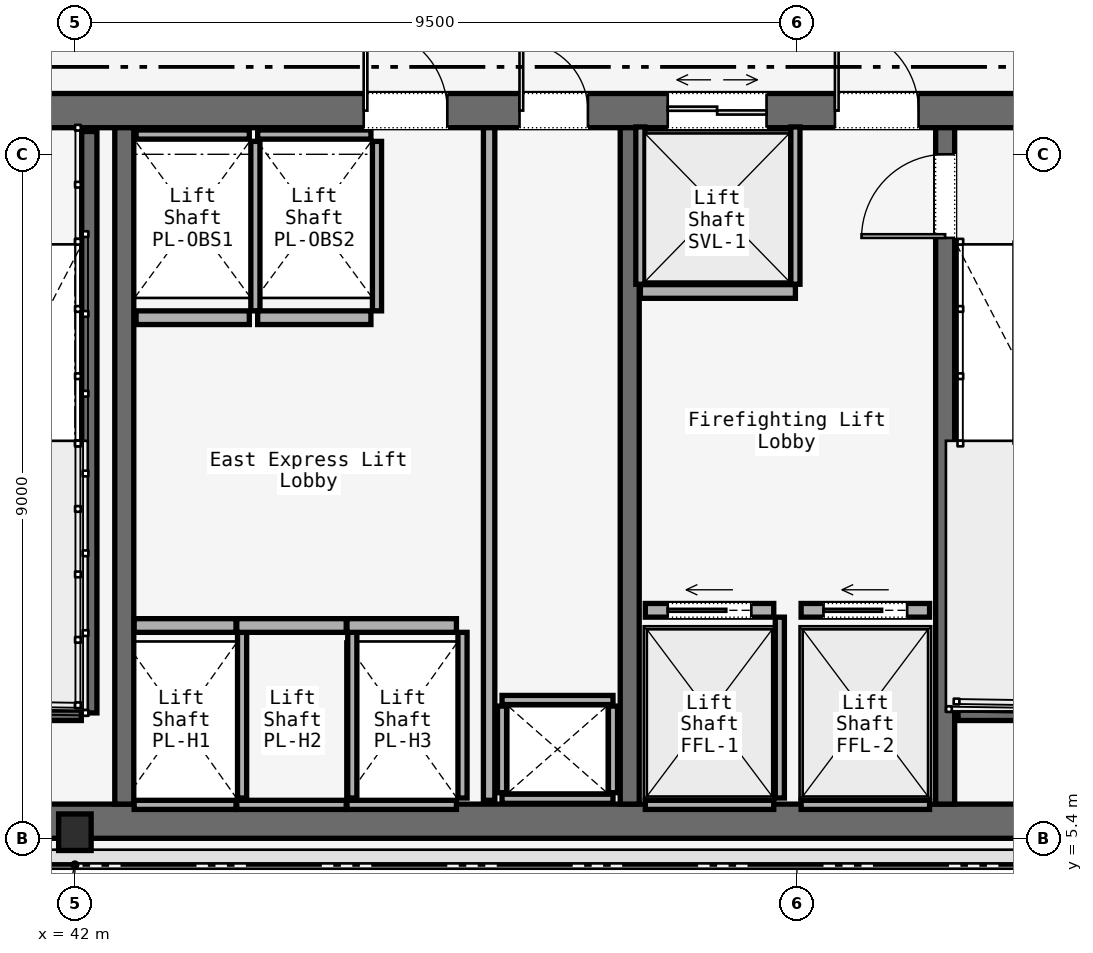
"""IFC4 building model, lengths in metres.
Left out: names, types, materials, properties, quantities, classifications, styles, units other than length and angle.
Written with IfcOpenShell. Run it as: python <this file> out.ifc"""

import sys

from ifc_helpers import new_model, si_unit, direction, frame, frame_2d, origin, origin_2d, place, context, subcontext, project, spatial, rectangle, i_section, extrude, element, fill, save


model = new_model("IFC4")
c1 = context("Model", 3, precision=1e-05, world=origin(), true_north=direction((0.0, 1.0)))
c2 = subcontext(c1, "Body", "Model", "MODEL_VIEW")
j1 = project(units=[si_unit("LENGTHUNIT", "METRE"), si_unit("PLANEANGLEUNIT", "RADIAN")], contexts=[c1])
p1 = place(None, origin())
s1 = spatial("IfcSite", under=j1, at=p1, CompositionType="ELEMENT")
p2 = place(p1, origin())
s2 = spatial("IfcBuilding", under=s1, at=p2, CompositionType="ELEMENT")
p3 = place(p2, frame((0.0, 0.0, 127.0)))
s3 = spatial("IfcBuildingStorey", under=s2, at=p3, CompositionType="ELEMENT", Elevation=127.0)
p4 = place(p3, frame((26.45, 14.975, 0.0), z_axis=(0.0, 0.0, 1.0), x_axis=(1.0, 0.0, 0.0)))
e1 = element("IfcWall", 1, at=p4, inside=s3, PredefinedType="SOLIDWALL", context=c2, shape_type="SweptSolid", body=[
    extrude(rectangle(XDim=31.1, YDim=0.45, at=frame_2d((15.55, 0.0))), origin(), (0.0, 0.0, 1.0), 3.58),
])
p5 = place(p4, frame((1.65, 0.0, 0.0)))
e2 = element("IfcOpeningElement", 2, at=p5, cuts=e1, PredefinedType="OPENING", context=c2, shape_type="SweptSolid", body=[
    extrude(rectangle(XDim=1.1, YDim=2.2, at=frame_2d((0.55, 1.1))), frame((0.0, 0.225, 0.0), z_axis=(0.0, -1.0, 0.0), x_axis=(1.0, 0.0, 0.0)), (0.0, 0.0, 1.0), 0.45),
])
p6 = place(p4, frame((13.65, 0.0, 0.0)))
e3 = element("IfcOpeningElement", 3, at=p6, cuts=e1, PredefinedType="OPENING", context=c2, shape_type="SweptSolid", body=[
    extrude(rectangle(XDim=1.1, YDim=2.2, at=frame_2d((0.55, 1.1))), frame((0.0, 0.225, 0.0), z_axis=(0.0, -1.0, 0.0), x_axis=(1.0, 0.0, 0.0)), (0.0, 0.0, 1.0), 0.45),
])
p7 = place(p4, frame((25.55, 0.0, 0.0)))
e4 = element("IfcOpeningElement", 4, at=p7, cuts=e1, PredefinedType="OPENING", context=c2, shape_type="SweptSolid", body=[
    extrude(rectangle(XDim=1.1, YDim=2.2, at=frame_2d((0.55, 1.1))), frame((0.0, 0.225, 0.0), z_axis=(0.0, -1.0, 0.0), x_axis=(1.0, 0.0, 0.0)), (0.0, 0.0, 1.0), 0.45),
])
p8 = place(p4, frame((10.7, 0.0, 0.0)))
e5 = element("IfcOpeningElement", 5, at=p8, cuts=e1, PredefinedType="OPENING", context=c2, shape_type="SweptSolid", body=[
    extrude(rectangle(XDim=1.4, YDim=2.2, at=frame_2d((0.7, 1.1))), frame((0.0, 0.225, 0.0), z_axis=(0.0, -1.0, 0.0), x_axis=(1.0, 0.0, 0.0)), (0.0, 0.0, 1.0), 0.45),
])
p9 = place(p4, frame((19.35, 0.0, 0.0)))
e6 = element("IfcOpeningElement", 6, at=p9, cuts=e1, PredefinedType="OPENING", context=c2, shape_type="SweptSolid", body=[
    extrude(rectangle(XDim=1.1, YDim=2.2, at=frame_2d((0.55, 1.1))), frame((0.0, 0.225, 0.0), z_axis=(0.0, -1.0, 0.0), x_axis=(1.0, 0.0, 0.0)), (0.0, 0.0, 1.0), 0.45),
])
p10 = place(p4, frame((21.4, 0.0, 0.0)))
e7 = element("IfcOpeningElement", 7, at=p10, cuts=e1, PredefinedType="OPENING", context=c2, shape_type="SweptSolid", body=[
    extrude(rectangle(XDim=0.9, YDim=2.1, at=frame_2d((0.45, 1.05))), frame((0.0, 0.225, 0.0), z_axis=(0.0, -1.0, 0.0), x_axis=(1.0, 0.0, 0.0)), (0.0, 0.0, 1.0), 0.45),
])
p11 = place(p4, frame((23.35, 0.0, 0.0)))
e8 = element("IfcOpeningElement", 8, at=p11, cuts=e1, PredefinedType="OPENING", context=c2, shape_type="SweptSolid", body=[
    extrude(rectangle(XDim=1.3, YDim=2.3, at=frame_2d((0.65, 1.15))), frame((0.0, 0.225, 0.0), z_axis=(0.0, -1.0, 0.0), x_axis=(1.0, 0.0, 0.0)), (0.0, 0.0, 1.0), 0.45),
])
p12 = place(p3, frame((26.45, 5.625, 0.0), z_axis=(0.0, 0.0, 1.0), x_axis=(1.0, 0.0, 0.0)))
e9 = element("IfcWall", 9, at=p12, inside=s3, PredefinedType="SOLIDWALL", context=c2, shape_type="SweptSolid", body=[
    extrude(rectangle(XDim=31.1, YDim=0.45, at=frame_2d((15.55, 0.0))), origin(), (0.0, 0.0, 1.0), 3.58),
])
for number, where, z_axis, x_axis in (
    (10, (42.65, 5.85, 0.0), (0.0, 0.0, 1.0), (0.0, 1.0, 0.0)),
    (11, (49.3, 5.85, 0.0), (0.0, 0.0, 1.0), (0.0, 1.0, 0.0)),
):
    element("IfcWall", number, at=place(p3, frame(where, z_axis=z_axis, x_axis=x_axis)), inside=s3, PredefinedType="SOLIDWALL", context=c2, shape_type="SweptSolid", body=[
        extrude(rectangle(XDim=8.9, YDim=0.25, at=frame_2d((4.45, 0.0))), origin(), (0.0, 0.0, 1.0), 3.58),
    ])
p13 = place(p3, frame((53.45, 5.85, 0.0), z_axis=(0.0, 0.0, 1.0), x_axis=(0.0, 1.0, 0.0)))
e12 = element("IfcWall", 12, at=p13, inside=s3, PredefinedType="SOLIDWALL", context=c2, shape_type="SweptSolid", body=[
    extrude(rectangle(XDim=8.9, YDim=0.25, at=frame_2d((4.45, 0.0))), origin(), (0.0, 0.0, 1.0), 3.58),
])
p14 = place(p13, frame((7.45, 0.0, 0.0)))
e13 = element("IfcOpeningElement", 13, at=p14, cuts=e12, PredefinedType="OPENING", context=c2, shape_type="SweptSolid", body=[
    extrude(rectangle(XDim=1.1, YDim=2.2, at=frame_2d((0.55, 1.1))), frame((0.0, 0.125, 0.0), z_axis=(0.0, -1.0, 0.0), x_axis=(1.0, 0.0, 0.0)), (0.0, 0.0, 1.0), 0.25),
])
p15 = place(p3, frame((42.0, 5.48, 0.0), z_axis=(0.0, 0.0, 1.0), x_axis=(1.0, 0.0, 0.0)))
e14 = element("IfcColumn", 14, at=p15, inside=s3, PredefinedType="COLUMN", context=c2, shape_type="SweptSolid", body=[
    extrude(i_section(OverallWidth=0.428, OverallDepth=0.481, WebThickness=0.051, FlangeThickness=0.065, FilletRadius=0.015, at=origin_2d()), origin(), (0.0, 0.0, 1.0), 3.58),
])
p16 = place(p3, frame((42.19, 14.7, 0.0), z_axis=(0.0, 0.0, 1.0), x_axis=(0.0, -1.0, 0.0)))
e15 = element("IfcWall", 15, at=p16, inside=s3, PredefinedType="SOLIDWALL", context=c2, shape_type="SweptSolid", body=[
    extrude(rectangle(XDim=7.65, YDim=0.2, at=frame_2d((3.825, 0.0))), origin(), (0.0, 0.0, 1.0), 3.8),
])
for number, where, z_axis, x_axis in (
    (16, (38.97, 7.05, 0.0), (0.0, 0.0, 1.0), (1.0, 0.0, 0.0)),
    (17, (53.62, 7.05, 0.0), (0.0, 0.0, 1.0), (1.0, 0.0, 0.0)),
):
    element("IfcWall", number, at=place(p3, frame(where, z_axis=z_axis, x_axis=x_axis)), inside=s3, PredefinedType="SOLIDWALL", context=c2, shape_type="SweptSolid", body=[
        extrude(rectangle(XDim=3.115, YDim=0.2, at=frame_2d((1.558, 0.0))), origin(), (0.0, 0.0, 1.0), 3.8),
    ])
for number, where, z_axis, x_axis in (
    (18, (47.62, 5.92, 0.0), (0.0, 0.0, 1.0), (1.0, 0.0, 0.0)),
    (19, (47.62, 7.22, 0.0), (0.0, 0.0, 1.0), (1.0, 0.0, 0.0)),
):
    element("IfcWall", number, at=place(p3, frame(where, z_axis=z_axis, x_axis=x_axis)), inside=s3, PredefinedType="SOLIDWALL", context=c2, shape_type="SweptSolid", body=[
        extrude(rectangle(XDim=1.46, YDim=0.12, at=frame_2d((0.73, 0.0))), origin(), (0.0, 0.0, 1.0), 3.01),
    ])
for number, where, z_axis, x_axis in (
    (20, (47.62, 6.0, 0.0), (0.0, 0.0, 1.0), (0.0, 1.0, 0.0)),
    (21, (49.08, 6.0, 0.0), (0.0, 0.0, 1.0), (0.0, 1.0, 0.0)),
):
    element("IfcWall", number, at=place(p3, frame(where, z_axis=z_axis, x_axis=x_axis)), inside=s3, PredefinedType="SOLIDWALL", context=c2, shape_type="SweptSolid", body=[
        extrude(rectangle(XDim=1.14, YDim=0.12, at=frame_2d((0.57, 0.0))), origin(), (0.0, 0.0, 1.0), 3.01),
    ])
p17 = place(p3, frame((47.45, 5.9, 0.0), z_axis=(0.0, 0.0, 1.0), x_axis=(0.0, 1.0, 0.0)))
e22 = element("IfcWall", 22, at=p17, inside=s3, PredefinedType="PARTITIONING", context=c2, shape_type="SweptSolid", body=[
    extrude(rectangle(XDim=8.85, YDim=0.15, at=frame_2d((4.425, 0.0))), origin(), (0.0, 0.0, 1.0), 3.01),
])
p18 = place(p3, frame((42.78, 8.2, 0.0), z_axis=(0.0, 0.0, 1.0), x_axis=(1.0, 0.0, 0.0)))
e23 = element("IfcWall", 23, at=p18, inside=s3, PredefinedType="SOLIDWALL", context=c2, shape_type="SweptSolid", body=[
    extrude(rectangle(XDim=1.34, YDim=0.18, at=frame_2d((0.67, 0.0))), origin(), (0.0, 0.0, 1.0), 3.01),
])
p19 = place(p3, frame((42.78, 5.84, 0.0), z_axis=(0.0, 0.0, 1.0), x_axis=(1.0, 0.0, 0.0)))
e24 = element("IfcWall", 24, at=p19, inside=s3, PredefinedType="SOLIDWALL", context=c2, shape_type="SweptSolid", body=[
    extrude(rectangle(XDim=1.34, YDim=0.12, at=frame_2d((0.67, 0.0))), origin(), (0.0, 0.0, 1.0), 3.01),
])
p20 = place(p3, frame((44.2, 5.93, 0.0), z_axis=(0.0, 0.0, 1.0), x_axis=(0.0, 1.0, 0.0)))
e25 = element("IfcWall", 25, at=p20, inside=s3, PredefinedType="SOLIDWALL", context=c2, shape_type="SweptSolid", body=[
    extrude(rectangle(XDim=2.18, YDim=0.12, at=frame_2d((1.09, 0.0))), origin(), (0.0, 0.0, 1.0), 3.01),
])
p21 = place(p3, frame((44.13, 8.2, 0.0), z_axis=(0.0, 0.0, 1.0), x_axis=(1.0, 0.0, 0.0)))
e26 = element("IfcWall", 26, at=p21, inside=s3, PredefinedType="SOLIDWALL", context=c2, shape_type="SweptSolid", body=[
    extrude(rectangle(XDim=1.44, YDim=0.18, at=frame_2d((0.72, 0.0))), origin(), (0.0, 0.0, 1.0), 3.01),
])
p22 = place(p3, frame((44.13, 5.84, 0.0), z_axis=(0.0, 0.0, 1.0), x_axis=(1.0, 0.0, 0.0)))
e27 = element("IfcWall", 27, at=p22, inside=s3, PredefinedType="SOLIDWALL", context=c2, shape_type="SweptSolid", body=[
    extrude(rectangle(XDim=1.44, YDim=0.12, at=frame_2d((0.72, 0.0))), origin(), (0.0, 0.0, 1.0), 3.01),
])
p23 = place(p3, frame((45.65, 5.93, 0.0), z_axis=(0.0, 0.0, 1.0), x_axis=(0.0, 1.0, 0.0)))
e28 = element("IfcWall", 28, at=p23, inside=s3, PredefinedType="SOLIDWALL", context=c2, shape_type="SweptSolid", body=[
    extrude(rectangle(XDim=2.18, YDim=0.12, at=frame_2d((1.09, 0.0))), origin(), (0.0, 0.0, 1.0), 3.01),
])
p24 = place(p3, frame((45.58, 8.2, 0.0), z_axis=(0.0, 0.0, 1.0), x_axis=(1.0, 0.0, 0.0)))
e29 = element("IfcWall", 29, at=p24, inside=s3, PredefinedType="SOLIDWALL", context=c2, shape_type="SweptSolid", body=[
    extrude(rectangle(XDim=1.44, YDim=0.18, at=frame_2d((0.72, 0.0))), origin(), (0.0, 0.0, 1.0), 3.01),
])
p25 = place(p3, frame((45.58, 5.84, 0.0), z_axis=(0.0, 0.0, 1.0), x_axis=(1.0, 0.0, 0.0)))
e30 = element("IfcWall", 30, at=p25, inside=s3, PredefinedType="SOLIDWALL", context=c2, shape_type="SweptSolid", body=[
    extrude(rectangle(XDim=1.44, YDim=0.12, at=frame_2d((0.72, 0.0))), origin(), (0.0, 0.0, 1.0), 3.01),
])
p26 = place(p3, frame((47.1, 5.93, 0.0), z_axis=(0.0, 0.0, 1.0), x_axis=(0.0, 1.0, 0.0)))
e31 = element("IfcWall", 31, at=p26, inside=s3, PredefinedType="SOLIDWALL", context=c2, shape_type="SweptSolid", body=[
    extrude(rectangle(XDim=2.18, YDim=0.12, at=frame_2d((1.09, 0.0))), origin(), (0.0, 0.0, 1.0), 3.01),
])
p27 = place(p3, frame((42.805, 12.25, 0.0), z_axis=(0.0, 0.0, 1.0), x_axis=(1.0, 0.0, 0.0)))
e32 = element("IfcWall", 32, at=p27, inside=s3, PredefinedType="SOLIDWALL", context=c2, shape_type="SweptSolid", body=[
    extrude(rectangle(XDim=1.49, YDim=0.18, at=frame_2d((0.745, 0.0))), origin(), (0.0, 0.0, 1.0), 3.01),
])
p28 = place(p3, frame((42.805, 14.66, 0.0), z_axis=(0.0, 0.0, 1.0), x_axis=(1.0, 0.0, 0.0)))
e33 = element("IfcWall", 33, at=p28, inside=s3, PredefinedType="SOLIDWALL", context=c2, shape_type="SweptSolid", body=[
    extrude(rectangle(XDim=1.49, YDim=0.12, at=frame_2d((0.745, 0.0))), origin(), (0.0, 0.0, 1.0), 3.01),
])
p29 = place(p3, frame((44.375, 12.34, 0.0), z_axis=(0.0, 0.0, 1.0), x_axis=(0.0, 1.0, 0.0)))
e34 = element("IfcWall", 34, at=p29, inside=s3, PredefinedType="SOLIDWALL", context=c2, shape_type="SweptSolid", body=[
    extrude(rectangle(XDim=2.23, YDim=0.12, at=frame_2d((1.115, 0.0))), origin(), (0.0, 0.0, 1.0), 3.01),
])
p30 = place(p3, frame((44.405, 12.25, 0.0), z_axis=(0.0, 0.0, 1.0), x_axis=(1.0, 0.0, 0.0)))
e35 = element("IfcWall", 35, at=p30, inside=s3, PredefinedType="SOLIDWALL", context=c2, shape_type="SweptSolid", body=[
    extrude(rectangle(XDim=1.49, YDim=0.18, at=frame_2d((0.745, 0.0))), origin(), (0.0, 0.0, 1.0), 3.01),
])
p31 = place(p3, frame((44.405, 14.66, 0.0), z_axis=(0.0, 0.0, 1.0), x_axis=(1.0, 0.0, 0.0)))
e36 = element("IfcWall", 36, at=p31, inside=s3, PredefinedType="SOLIDWALL", context=c2, shape_type="SweptSolid", body=[
    extrude(rectangle(XDim=1.49, YDim=0.12, at=frame_2d((0.745, 0.0))), origin(), (0.0, 0.0, 1.0), 3.01),
])
p32 = place(p3, frame((45.975, 12.34, 0.0), z_axis=(0.0, 0.0, 1.0), x_axis=(0.0, 1.0, 0.0)))
e37 = element("IfcWall", 37, at=p32, inside=s3, PredefinedType="SOLIDWALL", context=c2, shape_type="SweptSolid", body=[
    extrude(rectangle(XDim=2.23, YDim=0.12, at=frame_2d((1.115, 0.0))), origin(), (0.0, 0.0, 1.0), 3.01),
])
p33 = place(p3, frame((49.505, 8.4, 0.0), z_axis=(0.0, 0.0, 1.0), x_axis=(1.0, 0.0, 0.0)))
e38 = element("IfcWall", 38, at=p33, inside=s3, PredefinedType="SOLIDWALL", context=c2, shape_type="SweptSolid", body=[
    extrude(rectangle(XDim=1.69, YDim=0.18, at=frame_2d((0.845, 0.0))), origin(), (0.0, 0.0, 1.0), 3.01),
])
p34 = place(p33, frame((0.295, 0.0, 0.0)))
e39 = element("IfcOpeningElement", 39, at=p34, cuts=e38, PredefinedType="OPENING", context=c2, shape_type="SweptSolid", body=[
    extrude(rectangle(XDim=1.1, YDim=2.2, at=frame_2d((0.55, 1.1))), frame((0.0, 0.09, 0.0), z_axis=(0.0, -1.0, 0.0), x_axis=(1.0, 0.0, 0.0)), (0.0, 0.0, 1.0), 0.18),
])
p35 = place(p3, frame((49.505, 5.84, 0.0), z_axis=(0.0, 0.0, 1.0), x_axis=(1.0, 0.0, 0.0)))
e40 = element("IfcWall", 40, at=p35, inside=s3, PredefinedType="SOLIDWALL", context=c2, shape_type="SweptSolid", body=[
    extrude(rectangle(XDim=1.69, YDim=0.12, at=frame_2d((0.845, 0.0))), origin(), (0.0, 0.0, 1.0), 3.01),
])
p36 = place(p3, frame((51.275, 5.93, 0.0), z_axis=(0.0, 0.0, 1.0), x_axis=(0.0, 1.0, 0.0)))
e41 = element("IfcWall", 41, at=p36, inside=s3, PredefinedType="SOLIDWALL", context=c2, shape_type="SweptSolid", body=[
    extrude(rectangle(XDim=2.38, YDim=0.12, at=frame_2d((1.19, 0.0))), origin(), (0.0, 0.0, 1.0), 3.01),
])
p37 = place(p3, frame((51.555, 8.4, 0.0), z_axis=(0.0, 0.0, 1.0), x_axis=(1.0, 0.0, 0.0)))
e42 = element("IfcWall", 42, at=p37, inside=s3, PredefinedType="SOLIDWALL", context=c2, shape_type="SweptSolid", body=[
    extrude(rectangle(XDim=1.69, YDim=0.18, at=frame_2d((0.845, 0.0))), origin(), (0.0, 0.0, 1.0), 3.01),
])
p38 = place(p37, frame((0.295, 0.0, 0.0)))
e43 = element("IfcOpeningElement", 43, at=p38, cuts=e42, PredefinedType="OPENING", context=c2, shape_type="SweptSolid", body=[
    extrude(rectangle(XDim=1.1, YDim=2.2, at=frame_2d((0.55, 1.1))), frame((0.0, 0.09, 0.0), z_axis=(0.0, -1.0, 0.0), x_axis=(1.0, 0.0, 0.0)), (0.0, 0.0, 1.0), 0.18),
])
p39 = place(p3, frame((51.555, 5.84, 0.0), z_axis=(0.0, 0.0, 1.0), x_axis=(1.0, 0.0, 0.0)))
e44 = element("IfcWall", 44, at=p39, inside=s3, PredefinedType="SOLIDWALL", context=c2, shape_type="SweptSolid", body=[
    extrude(rectangle(XDim=1.69, YDim=0.12, at=frame_2d((0.845, 0.0))), origin(), (0.0, 0.0, 1.0), 3.01),
])
p40 = place(p3, frame((49.44, 12.595, 0.0), z_axis=(0.0, 0.0, 1.0), x_axis=(1.0, 0.0, 0.0)))
e45 = element("IfcWall", 45, at=p40, inside=s3, PredefinedType="SOLIDWALL", context=c2, shape_type="SweptSolid", body=[
    extrude(rectangle(XDim=2.04, YDim=0.18, at=frame_2d((1.02, 0.0))), origin(), (0.0, 0.0, 1.0), 3.01),
])
for number, where, z_axis, x_axis in (
    (46, (49.44, 12.69, 0.0), (0.0, 0.0, 1.0), (0.0, 1.0, 0.0)),
    (47, (51.48, 12.69, 0.0), (0.0, 0.0, 1.0), (0.0, 1.0, 0.0)),
):
    element("IfcWall", number, at=place(p3, frame(where, z_axis=z_axis, x_axis=x_axis)), inside=s3, PredefinedType="SOLIDWALL", context=c2, shape_type="SweptSolid", body=[
        extrude(rectangle(XDim=2.07, YDim=0.12, at=frame_2d((1.035, 0.0))), origin(), (0.0, 0.0, 1.0), 3.01),
    ])
p41 = place(p7, origin())
e48 = element("IfcDoor", 48, at=p41, inside=s3, OperationType="SINGLE_SWING_RIGHT", PredefinedType="DOOR", context=c2, shape_type="SweptSolid", body=[
    extrude(rectangle(XDim=1.1, YDim=2.2, at=frame_2d((0.55, 1.1))), frame((0.0, 0.025, 0.0), z_axis=(0.0, -1.0, 0.0), x_axis=(1.0, 0.0, 0.0)), (0.0, 0.0, 1.0), 0.05),
])
fill(e4, e48)
p42 = place(p9, origin())
e49 = element("IfcDoor", 49, at=p42, inside=s3, OperationType="SINGLE_SWING_LEFT", PredefinedType="DOOR", context=c2, shape_type="SweptSolid", body=[
    extrude(rectangle(XDim=1.1, YDim=2.2, at=frame_2d((0.55, 1.1))), frame((0.0, 0.025, 0.0), z_axis=(0.0, -1.0, 0.0), x_axis=(1.0, 0.0, 0.0)), (0.0, 0.0, 1.0), 0.05),
])
fill(e6, e49)
p43 = place(p10, origin())
e50 = element("IfcDoor", 50, at=p43, inside=s3, OperationType="SINGLE_SWING_LEFT", PredefinedType="DOOR", context=c2, shape_type="SweptSolid", body=[
    extrude(rectangle(XDim=0.9, YDim=2.1, at=frame_2d((0.45, 1.05))), frame((0.0, 0.025, 0.0), z_axis=(0.0, -1.0, 0.0), x_axis=(1.0, 0.0, 0.0)), (0.0, 0.0, 1.0), 0.05),
])
fill(e7, e50)
p44 = place(p14, origin())
e51 = element("IfcDoor", 51, at=p44, inside=s3, OperationType="SINGLE_SWING_LEFT", PredefinedType="DOOR", context=c2, shape_type="SweptSolid", body=[
    extrude(rectangle(XDim=1.1, YDim=2.2, at=frame_2d((0.55, 1.1))), frame((0.0, 0.025, 0.0), z_axis=(0.0, -1.0, 0.0), x_axis=(1.0, 0.0, 0.0)), (0.0, 0.0, 1.0), 0.05),
])
fill(e13, e51)
p45 = place(p34, origin())
e52 = element("IfcDoor", 52, at=p45, inside=s3, OperationType="SLIDING_TO_LEFT", PredefinedType="DOOR", context=c2, shape_type="SweptSolid", body=[
    extrude(rectangle(XDim=1.1, YDim=2.2, at=frame_2d((0.55, 1.1))), frame((0.0, 0.025, 0.0), z_axis=(0.0, -1.0, 0.0), x_axis=(1.0, 0.0, 0.0)), (0.0, 0.0, 1.0), 0.05),
])
fill(e39, e52)
p46 = place(p38, origin())
e53 = element("IfcDoor", 53, at=p46, inside=s3, OperationType="SLIDING_TO_LEFT", PredefinedType="DOOR", context=c2, shape_type="SweptSolid", body=[
    extrude(rectangle(XDim=1.1, YDim=2.2, at=frame_2d((0.55, 1.1))), frame((0.0, 0.025, 0.0), z_axis=(0.0, -1.0, 0.0), x_axis=(1.0, 0.0, 0.0)), (0.0, 0.0, 1.0), 0.05),
])
fill(e43, e53)
p47 = place(p11, origin())
e54 = element("IfcDoor", 54, at=p47, inside=s3, OperationType="DOUBLE_DOOR_SLIDING", PredefinedType="DOOR", context=c2, shape_type="SweptSolid", body=[
    extrude(rectangle(XDim=1.3, YDim=2.3, at=frame_2d((0.65, 1.15))), frame((0.0, 0.025, 0.0), z_axis=(0.0, -1.0, 0.0), x_axis=(1.0, 0.0, 0.0)), (0.0, 0.0, 1.0), 0.05),
])
fill(e8, e54)
save(model, sys.argv[1])
